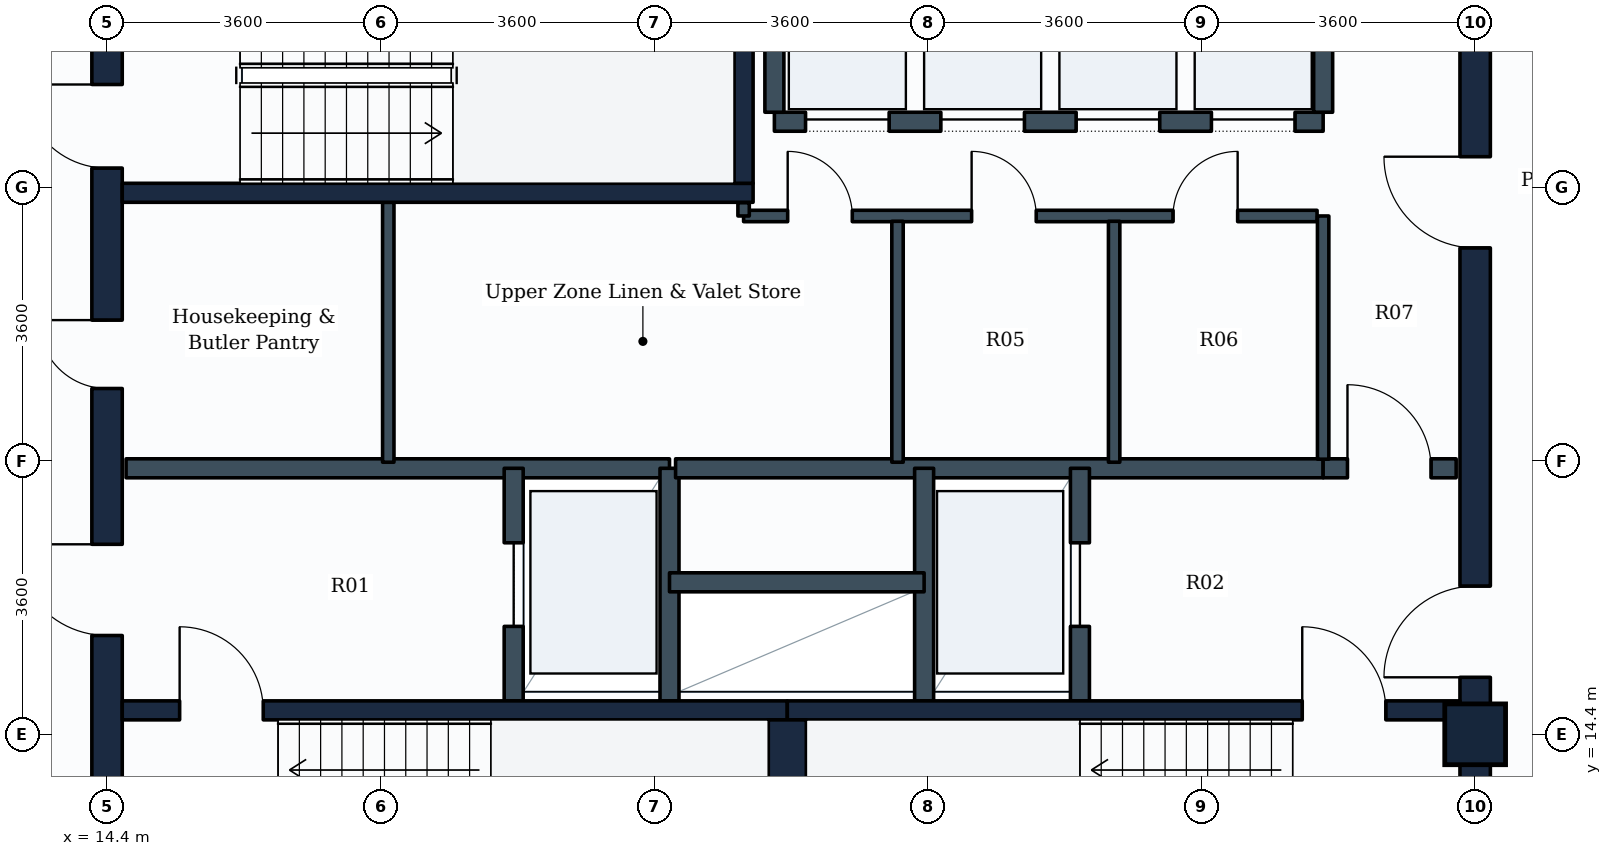
"""IFC4 building model, lengths in metres.
Left out: names, types, materials, properties, quantities, classifications, styles, units other than length and angle.
Written with IfcOpenShell. Run it as: python <this file> out.ifc"""

import sys

from ifc_helpers import new_model, si_unit, direction, frame, frame_2d, origin, origin_2d, place, context, subcontext, project, spatial, rectangle, extrude, element, fill, save


model = new_model("IFC4")
c1 = context("Model", 3, precision=1e-05, world=origin(), true_north=direction((0.0, 1.0)))
c2 = subcontext(c1, "Body", "Model", "MODEL_VIEW")
j1 = project(units=[si_unit("LENGTHUNIT", "METRE"), si_unit("PLANEANGLEUNIT", "RADIAN")], contexts=[c1])
p1 = place(None, origin())
s1 = spatial("IfcSite", under=j1, at=p1, CompositionType="ELEMENT")
p2 = place(p1, origin())
s2 = spatial("IfcBuilding", under=s1, at=p2, CompositionType="ELEMENT")
p3 = place(p2, frame((0.0, 0.0, 246.2)))
s3 = spatial("IfcBuildingStorey", under=s2, at=p3, CompositionType="ELEMENT", Elevation=246.2)
p4 = place(p3, frame((32.4, 14.4, 0.0), z_axis=(0.0, 0.0, 1.0), x_axis=(1.0, 0.0, 0.0)))
e1 = element("IfcColumn", 1, at=p4, inside=s3, PredefinedType="COLUMN", context=c2, shape_type="SweptSolid", body=[
    extrude(rectangle(XDim=0.8, YDim=0.8, at=origin_2d()), origin(), (0.0, 0.0, 1.0), 3.6),
])
p5 = place(p3, frame((14.4, 10.8, 0.0), z_axis=(0.0, 0.0, 1.0), x_axis=(0.0, 1.0, 0.0)))
e2 = element("IfcWall", 2, at=p5, inside=s3, PredefinedType="SHEAR", context=c2, shape_type="SweptSolid", body=[
    extrude(rectangle(XDim=14.4, YDim=0.4, at=frame_2d((7.2, 0.0))), origin(), (0.0, 0.0, 1.0), 3.28),
])
p6 = place(p5, frame((11.05, 0.0, 0.0)))
e3 = element("IfcOpeningElement", 3, at=p6, cuts=e2, PredefinedType="OPENING", context=c2, shape_type="SweptSolid", body=[
    extrude(rectangle(XDim=1.1, YDim=2.1, at=frame_2d((0.55, 1.05))), frame((0.0, 0.21, 0.0), z_axis=(0.0, -1.0, 0.0), x_axis=(1.0, 0.0, 0.0)), (0.0, 0.0, 1.0), 0.42),
])
p7 = place(p5, frame((4.9, 0.0, 0.0)))
e4 = element("IfcOpeningElement", 4, at=p7, cuts=e2, PredefinedType="OPENING", context=c2, shape_type="SweptSolid", body=[
    extrude(rectangle(XDim=1.2, YDim=2.1, at=frame_2d((0.6, 1.05))), frame((0.0, 0.21, 0.0), z_axis=(0.0, -1.0, 0.0), x_axis=(1.0, 0.0, 0.0)), (0.0, 0.0, 1.0), 0.42),
])
p8 = place(p5, frame((8.15, 0.0, 0.0)))
e5 = element("IfcOpeningElement", 5, at=p8, cuts=e2, PredefinedType="OPENING", context=c2, shape_type="SweptSolid", body=[
    extrude(rectangle(XDim=0.9, YDim=2.1, at=frame_2d((0.45, 1.05))), frame((0.0, 0.21, 0.0), z_axis=(0.0, -1.0, 0.0), x_axis=(1.0, 0.0, 0.0)), (0.0, 0.0, 1.0), 0.42),
])
p9 = place(p3, frame((32.4, 10.8, 0.0), z_axis=(0.0, 0.0, 1.0), x_axis=(0.0, 1.0, 0.0)))
e6 = element("IfcWall", 6, at=p9, inside=s3, PredefinedType="SHEAR", context=c2, shape_type="SweptSolid", body=[
    extrude(rectangle(XDim=14.4, YDim=0.4, at=frame_2d((7.2, 0.0))), origin(), (0.0, 0.0, 1.0), 3.28),
])
p10 = place(p9, frame((4.35, 0.0, 0.0)))
e7 = element("IfcOpeningElement", 7, at=p10, cuts=e6, PredefinedType="OPENING", context=c2, shape_type="SweptSolid", body=[
    extrude(rectangle(XDim=1.2, YDim=2.1, at=frame_2d((0.6, 1.05))), frame((0.0, 0.21, 0.0), z_axis=(0.0, -1.0, 0.0), x_axis=(1.0, 0.0, 0.0)), (0.0, 0.0, 1.0), 0.42),
])
p11 = place(p9, frame((10.0, 0.0, 0.0)))
e8 = element("IfcOpeningElement", 8, at=p11, cuts=e6, PredefinedType="OPENING", context=c2, shape_type="SweptSolid", body=[
    extrude(rectangle(XDim=1.2, YDim=2.1, at=frame_2d((0.6, 1.05))), frame((0.0, 0.21, 0.0), z_axis=(0.0, -1.0, 0.0), x_axis=(1.0, 0.0, 0.0)), (0.0, 0.0, 1.0), 0.42),
])
p12 = place(p3, frame((14.6, 14.715, 0.0), z_axis=(0.0, 0.0, 1.0), x_axis=(1.0, 0.0, 0.0)))
e9 = element("IfcWall", 9, at=p12, inside=s3, PredefinedType="SHEAR", context=c2, shape_type="SweptSolid", body=[
    extrude(rectangle(XDim=8.75, YDim=0.25, at=frame_2d((4.375, 0.0))), origin(), (0.0, 0.0, 1.0), 3.28),
])
p13 = place(p12, frame((0.755, 0.0, 0.0)))
e10 = element("IfcOpeningElement", 10, at=p13, cuts=e9, PredefinedType="OPENING", context=c2, shape_type="SweptSolid", body=[
    extrude(rectangle(XDim=1.1, YDim=2.1, at=frame_2d((0.55, 1.05))), frame((0.0, 0.135, 0.0), z_axis=(0.0, -1.0, 0.0), x_axis=(1.0, 0.0, 0.0)), (0.0, 0.0, 1.0), 0.27),
])
p14 = place(p3, frame((23.35, 14.715, 0.0), z_axis=(0.0, 0.0, 1.0), x_axis=(1.0, 0.0, 0.0)))
e11 = element("IfcWall", 11, at=p14, inside=s3, PredefinedType="SHEAR", context=c2, shape_type="SweptSolid", body=[
    extrude(rectangle(XDim=8.85, YDim=0.25, at=frame_2d((4.425, 0.0))), origin(), (0.0, 0.0, 1.0), 3.28),
])
p15 = place(p14, frame((6.775, 0.0, 0.0)))
e12 = element("IfcOpeningElement", 12, at=p15, cuts=e11, PredefinedType="OPENING", context=c2, shape_type="SweptSolid", body=[
    extrude(rectangle(XDim=1.1, YDim=2.1, at=frame_2d((0.55, 1.05))), frame((0.0, 0.135, 0.0), z_axis=(0.0, -1.0, 0.0), x_axis=(1.0, 0.0, 0.0)), (0.0, 0.0, 1.0), 0.27),
])
p16 = place(p3, frame((23.35, 11.75, 0.0), z_axis=(0.0, 0.0, 1.0), x_axis=(0.0, 1.0, 0.0)))
e13 = element("IfcWall", 13, at=p16, inside=s3, PredefinedType="SHEAR", context=c2, shape_type="SweptSolid", body=[
    extrude(rectangle(XDim=2.84, YDim=0.5, at=frame_2d((1.42, 0.0))), origin(), (0.0, 0.0, 1.0), 3.28),
])
p17 = place(p3, frame((14.6, 21.525, 0.0), z_axis=(0.0, 0.0, 1.0), x_axis=(1.0, 0.0, 0.0)))
e14 = element("IfcWall", 14, at=p17, inside=s3, PredefinedType="SHEAR", context=c2, shape_type="SweptSolid", body=[
    extrude(rectangle(XDim=8.3, YDim=0.25, at=frame_2d((4.15, 0.0))), origin(), (0.0, 0.0, 1.0), 3.28),
])
p18 = place(p3, frame((22.775, 21.65, 0.0), z_axis=(0.0, 0.0, 1.0), x_axis=(0.0, 1.0, 0.0)))
e15 = element("IfcWall", 15, at=p18, inside=s3, PredefinedType="SHEAR", context=c2, shape_type="SweptSolid", body=[
    extrude(rectangle(XDim=2.84, YDim=0.25, at=frame_2d((1.42, 0.0))), origin(), (0.0, 0.0, 1.0), 3.28),
])
p19 = place(p3, frame((14.65, 17.9, 0.0), z_axis=(0.0, 0.0, 1.0), x_axis=(1.0, 0.0, 0.0)))
e16 = element("IfcWall", 16, at=p19, inside=s3, PredefinedType="PARTITIONING", context=c2, shape_type="SweptSolid", body=[
    extrude(rectangle(XDim=7.15, YDim=0.25, at=frame_2d((3.575, 0.0))), origin(), (0.0, 0.0, 1.0), 3.265),
])
p20 = place(p3, frame((19.75, 14.84, 0.0), z_axis=(0.0, 0.0, 1.0), x_axis=(0.0, 1.0, 0.0)))
e17 = element("IfcWall", 17, at=p20, inside=s3, PredefinedType="PARTITIONING", context=c2, shape_type="SweptSolid", body=[
    extrude(rectangle(XDim=3.06, YDim=0.25, at=frame_2d((1.53, 0.0))), origin(), (0.0, 0.0, 1.0), 3.265),
])
p21 = place(p20, frame((0.98, 0.0, 0.0)))
e18 = element("IfcOpeningElement", 18, at=p21, cuts=e17, PredefinedType="OPENING", context=c2, shape_type="SweptSolid", body=[
    extrude(rectangle(XDim=1.1, YDim=2.1, at=frame_2d((0.55, 1.05))), frame((0.0, 0.135, 0.0), z_axis=(0.0, -1.0, 0.0), x_axis=(1.0, 0.0, 0.0)), (0.0, 0.0, 1.0), 0.27),
])
p22 = place(p3, frame((21.8, 14.84, 0.0), z_axis=(0.0, 0.0, 1.0), x_axis=(0.0, 1.0, 0.0)))
e19 = element("IfcWall", 19, at=p22, inside=s3, PredefinedType="PARTITIONING", context=c2, shape_type="SweptSolid", body=[
    extrude(rectangle(XDim=3.06, YDim=0.25, at=frame_2d((1.53, 0.0))), origin(), (0.0, 0.0, 1.0), 3.265),
])
p23 = place(p3, frame((21.88, 17.9, 0.0), z_axis=(0.0, 0.0, 1.0), x_axis=(1.0, 0.0, 0.0)))
e20 = element("IfcWall", 20, at=p23, inside=s3, PredefinedType="PARTITIONING", context=c2, shape_type="SweptSolid", body=[
    extrude(rectangle(XDim=8.52, YDim=0.25, at=frame_2d((4.26, 0.0))), origin(), (0.0, 0.0, 1.0), 3.265),
])
p24 = place(p3, frame((30.4, 17.9, 0.0), z_axis=(0.0, 0.0, 1.0), x_axis=(1.0, 0.0, 0.0)))
e21 = element("IfcWall", 21, at=p24, inside=s3, PredefinedType="PARTITIONING", context=c2, shape_type="SweptSolid", body=[
    extrude(rectangle(XDim=1.75, YDim=0.25, at=frame_2d((0.875, 0.0))), origin(), (0.0, 0.0, 1.0), 3.265),
])
p25 = place(p24, frame((0.32, 0.0, 0.0)))
e22 = element("IfcOpeningElement", 22, at=p25, cuts=e21, PredefinedType="OPENING", context=c2, shape_type="SweptSolid", body=[
    extrude(rectangle(XDim=1.1, YDim=2.1, at=frame_2d((0.55, 1.05))), frame((0.0, 0.135, 0.0), z_axis=(0.0, -1.0, 0.0), x_axis=(1.0, 0.0, 0.0)), (0.0, 0.0, 1.0), 0.27),
])
p26 = place(p3, frame((25.15, 14.84, 0.0), z_axis=(0.0, 0.0, 1.0), x_axis=(0.0, 1.0, 0.0)))
e23 = element("IfcWall", 23, at=p26, inside=s3, PredefinedType="PARTITIONING", context=c2, shape_type="SweptSolid", body=[
    extrude(rectangle(XDim=3.06, YDim=0.25, at=frame_2d((1.53, 0.0))), origin(), (0.0, 0.0, 1.0), 3.265),
])
p27 = place(p3, frame((27.2, 14.84, 0.0), z_axis=(0.0, 0.0, 1.0), x_axis=(0.0, 1.0, 0.0)))
e24 = element("IfcWall", 24, at=p27, inside=s3, PredefinedType="PARTITIONING", context=c2, shape_type="SweptSolid", body=[
    extrude(rectangle(XDim=3.06, YDim=0.25, at=frame_2d((1.53, 0.0))), origin(), (0.0, 0.0, 1.0), 3.265),
])
p28 = place(p27, frame((0.98, 0.0, 0.0)))
e25 = element("IfcOpeningElement", 25, at=p28, cuts=e24, PredefinedType="OPENING", context=c2, shape_type="SweptSolid", body=[
    extrude(rectangle(XDim=1.1, YDim=2.1, at=frame_2d((0.55, 1.05))), frame((0.0, 0.135, 0.0), z_axis=(0.0, -1.0, 0.0), x_axis=(1.0, 0.0, 0.0)), (0.0, 0.0, 1.0), 0.27),
])
p29 = place(p3, frame((21.8, 16.4, 0.0), z_axis=(0.0, 0.0, 1.0), x_axis=(1.0, 0.0, 0.0)))
e26 = element("IfcWall", 26, at=p29, inside=s3, PredefinedType="PARTITIONING", context=c2, shape_type="SweptSolid", body=[
    extrude(rectangle(XDim=3.35, YDim=0.25, at=frame_2d((1.675, 0.0))), origin(), (0.0, 0.0, 1.0), 3.265),
])
p30 = place(p3, frame((23.18, 22.46, 0.0), z_axis=(0.0, 0.0, 1.0), x_axis=(1.0, 0.0, 0.0)))
e27 = element("IfcWall", 27, at=p30, inside=s3, PredefinedType="PARTITIONING", context=c2, shape_type="SweptSolid", body=[
    extrude(rectangle(XDim=7.22, YDim=0.25, at=frame_2d((3.61, 0.0))), origin(), (0.0, 0.0, 1.0), 3.265),
])
p31 = place(p30, frame((0.41, 0.0, 0.0)))
e28 = element("IfcOpeningElement", 28, at=p31, cuts=e27, PredefinedType="OPENING", context=c2, shape_type="SweptSolid", body=[
    extrude(rectangle(XDim=1.1, YDim=2.1, at=frame_2d((0.55, 1.05))), frame((0.0, 0.135, 0.0), z_axis=(0.0, -1.0, 0.0), x_axis=(1.0, 0.0, 0.0)), (0.0, 0.0, 1.0), 0.27),
])
p32 = place(p30, frame((2.19, 0.0, 0.0)))
e29 = element("IfcOpeningElement", 29, at=p32, cuts=e27, PredefinedType="OPENING", context=c2, shape_type="SweptSolid", body=[
    extrude(rectangle(XDim=1.1, YDim=2.1, at=frame_2d((0.55, 1.05))), frame((0.0, 0.135, 0.0), z_axis=(0.0, -1.0, 0.0), x_axis=(1.0, 0.0, 0.0)), (0.0, 0.0, 1.0), 0.27),
])
p33 = place(p30, frame((3.97, 0.0, 0.0)))
e30 = element("IfcOpeningElement", 30, at=p33, cuts=e27, PredefinedType="OPENING", context=c2, shape_type="SweptSolid", body=[
    extrude(rectangle(XDim=1.1, YDim=2.1, at=frame_2d((0.55, 1.05))), frame((0.0, 0.135, 0.0), z_axis=(0.0, -1.0, 0.0), x_axis=(1.0, 0.0, 0.0)), (0.0, 0.0, 1.0), 0.27),
])
p34 = place(p30, frame((5.75, 0.0, 0.0)))
e31 = element("IfcOpeningElement", 31, at=p34, cuts=e27, PredefinedType="OPENING", context=c2, shape_type="SweptSolid", body=[
    extrude(rectangle(XDim=1.1, YDim=2.1, at=frame_2d((0.55, 1.05))), frame((0.0, 0.135, 0.0), z_axis=(0.0, -1.0, 0.0), x_axis=(1.0, 0.0, 0.0)), (0.0, 0.0, 1.0), 0.27),
])
for number, where, z_axis, x_axis in (
    (32, (23.18, 22.585, 0.0), (0.0, 0.0, 1.0), (0.0, 1.0, 0.0)),
    (33, (30.4, 22.585, 0.0), (0.0, 0.0, 1.0), (0.0, 1.0, 0.0)),
):
    element("IfcWall", number, at=place(p3, frame(where, z_axis=z_axis, x_axis=x_axis)), inside=s3, PredefinedType="PARTITIONING", context=c2, shape_type="SweptSolid", body=[
        extrude(rectangle(XDim=2.315, YDim=0.25, at=frame_2d((1.157, 0.0))), origin(), (0.0, 0.0, 1.0), 3.265),
    ])
p35 = place(p3, frame((22.775, 21.22, 0.0), z_axis=(0.0, 0.0, 1.0), x_axis=(1.0, 0.0, 0.0)))
e34 = element("IfcWall", 34, at=p35, inside=s3, PredefinedType="PARTITIONING", context=c2, shape_type="SweptSolid", body=[
    extrude(rectangle(XDim=7.545, YDim=0.15, at=frame_2d((3.772, 0.0))), origin(), (0.0, 0.0, 1.0), 3.265),
])
p36 = place(p35, frame((0.58, 0.0, 0.0)))
e35 = element("IfcOpeningElement", 35, at=p36, cuts=e34, PredefinedType="OPENING", context=c2, shape_type="SweptSolid", body=[
    extrude(rectangle(XDim=0.85, YDim=2.1, at=frame_2d((0.425, 1.05))), frame((0.0, 0.085, 0.0), z_axis=(0.0, -1.0, 0.0), x_axis=(1.0, 0.0, 0.0)), (0.0, 0.0, 1.0), 0.17),
])
p37 = place(p35, frame((3.0, 0.0, 0.0)))
e36 = element("IfcOpeningElement", 36, at=p37, cuts=e34, PredefinedType="OPENING", context=c2, shape_type="SweptSolid", body=[
    extrude(rectangle(XDim=0.85, YDim=2.1, at=frame_2d((0.425, 1.05))), frame((0.0, 0.085, 0.0), z_axis=(0.0, -1.0, 0.0), x_axis=(1.0, 0.0, 0.0)), (0.0, 0.0, 1.0), 0.17),
])
p38 = place(p35, frame((5.65, 0.0, 0.0)))
e37 = element("IfcOpeningElement", 37, at=p38, cuts=e34, PredefinedType="OPENING", context=c2, shape_type="SweptSolid", body=[
    extrude(rectangle(XDim=0.85, YDim=2.1, at=frame_2d((0.425, 1.05))), frame((0.0, 0.085, 0.0), z_axis=(0.0, -1.0, 0.0), x_axis=(1.0, 0.0, 0.0)), (0.0, 0.0, 1.0), 0.17),
])
p39 = place(p3, frame((22.775, 21.22, 0.0), z_axis=(0.0, 0.0, 1.0), x_axis=(0.0, 1.0, 0.0)))
e38 = element("IfcWall", 38, at=p39, inside=s3, PredefinedType="PARTITIONING", context=c2, shape_type="SweptSolid", body=[
    extrude(rectangle(XDim=0.175, YDim=0.15, at=frame_2d((0.087, 0.0))), origin(), (0.0, 0.0, 1.0), 3.265),
])
p40 = place(p3, frame((30.4, 18.02, 0.0), z_axis=(0.0, 0.0, 1.0), x_axis=(0.0, 1.0, 0.0)))
e39 = element("IfcWall", 39, at=p40, inside=s3, PredefinedType="PARTITIONING", context=c2, shape_type="SweptSolid", body=[
    extrude(rectangle(XDim=3.2, YDim=0.15, at=frame_2d((1.6, 0.0))), origin(), (0.0, 0.0, 1.0), 3.265),
])
p41 = place(p3, frame((18.1, 17.98, 0.0), z_axis=(0.0, 0.0, 1.0), x_axis=(0.0, 1.0, 0.0)))
e40 = element("IfcWall", 40, at=p41, inside=s3, PredefinedType="PARTITIONING", context=c2, shape_type="SweptSolid", body=[
    extrude(rectangle(XDim=3.42, YDim=0.15, at=frame_2d((1.71, 0.0))), origin(), (0.0, 0.0, 1.0), 3.265),
])
for number, where, z_axis, x_axis in (
    (41, (24.8, 17.98, 0.0), (0.0, 0.0, 1.0), (0.0, 1.0, 0.0)),
    (42, (27.65, 17.98, 0.0), (0.0, 0.0, 1.0), (0.0, 1.0, 0.0)),
):
    element("IfcWall", number, at=place(p3, frame(where, z_axis=z_axis, x_axis=x_axis)), inside=s3, PredefinedType="PARTITIONING", context=c2, shape_type="SweptSolid", body=[
        extrude(rectangle(XDim=3.17, YDim=0.15, at=frame_2d((1.585, 0.0))), origin(), (0.0, 0.0, 1.0), 3.265),
    ])
p42 = place(p13, origin())
e43 = element("IfcDoor", 43, at=p42, inside=s3, OperationType="SINGLE_SWING_LEFT", PredefinedType="DOOR", context=c2, shape_type="SweptSolid", body=[
    extrude(rectangle(XDim=1.1, YDim=2.1, at=frame_2d((0.55, 1.05))), frame((0.0, 0.025, 0.0), z_axis=(0.0, -1.0, 0.0), x_axis=(1.0, 0.0, 0.0)), (0.0, 0.0, 1.0), 0.05),
])
fill(e10, e43)
p43 = place(p15, origin())
e44 = element("IfcDoor", 44, at=p43, inside=s3, OperationType="SINGLE_SWING_LEFT", PredefinedType="DOOR", context=c2, shape_type="SweptSolid", body=[
    extrude(rectangle(XDim=1.1, YDim=2.1, at=frame_2d((0.55, 1.05))), frame((0.0, 0.025, 0.0), z_axis=(0.0, -1.0, 0.0), x_axis=(1.0, 0.0, 0.0)), (0.0, 0.0, 1.0), 0.05),
])
fill(e12, e44)
p44 = place(p6, origin())
e45 = element("IfcDoor", 45, at=p44, inside=s3, OperationType="SINGLE_SWING_RIGHT", PredefinedType="DOOR", context=c2, shape_type="SweptSolid", body=[
    extrude(rectangle(XDim=1.1, YDim=2.1, at=frame_2d((0.55, 1.05))), frame((0.0, 0.025, 0.0), z_axis=(0.0, -1.0, 0.0), x_axis=(1.0, 0.0, 0.0)), (0.0, 0.0, 1.0), 0.05),
])
fill(e3, e45)
p45 = place(p21, origin())
e46 = element("IfcDoor", 46, at=p45, inside=s3, OperationType="SLIDING_TO_LEFT", PredefinedType="DOOR", context=c2, shape_type="SweptSolid", body=[
    extrude(rectangle(XDim=1.1, YDim=2.1, at=frame_2d((0.55, 1.05))), frame((0.0, 0.025, 0.0), z_axis=(0.0, -1.0, 0.0), x_axis=(1.0, 0.0, 0.0)), (0.0, 0.0, 1.0), 0.05),
])
fill(e18, e46)
p46 = place(p28, origin())
e47 = element("IfcDoor", 47, at=p46, inside=s3, OperationType="SLIDING_TO_LEFT", PredefinedType="DOOR", context=c2, shape_type="SweptSolid", body=[
    extrude(rectangle(XDim=1.1, YDim=2.1, at=frame_2d((0.55, 1.05))), frame((0.0, 0.025, 0.0), z_axis=(0.0, -1.0, 0.0), x_axis=(1.0, 0.0, 0.0)), (0.0, 0.0, 1.0), 0.05),
])
fill(e25, e47)
p47 = place(p7, origin())
e48 = element("IfcDoor", 48, at=p47, inside=s3, OperationType="SINGLE_SWING_RIGHT", PredefinedType="DOOR", context=c2, shape_type="SweptSolid", body=[
    extrude(rectangle(XDim=1.2, YDim=2.1, at=frame_2d((0.6, 1.05))), frame((0.0, 0.025, 0.0), z_axis=(0.0, -1.0, 0.0), x_axis=(1.0, 0.0, 0.0)), (0.0, 0.0, 1.0), 0.05),
])
fill(e4, e48)
p48 = place(p10, origin())
e49 = element("IfcDoor", 49, at=p48, inside=s3, OperationType="SINGLE_SWING_LEFT", PredefinedType="DOOR", context=c2, shape_type="SweptSolid", body=[
    extrude(rectangle(XDim=1.2, YDim=2.1, at=frame_2d((0.6, 1.05))), frame((0.0, 0.025, 0.0), z_axis=(0.0, -1.0, 0.0), x_axis=(1.0, 0.0, 0.0)), (0.0, 0.0, 1.0), 0.05),
])
fill(e7, e49)
p49 = place(p25, origin())
e50 = element("IfcDoor", 50, at=p49, inside=s3, OperationType="SINGLE_SWING_LEFT", PredefinedType="DOOR", context=c2, shape_type="SweptSolid", body=[
    extrude(rectangle(XDim=1.1, YDim=2.1, at=frame_2d((0.55, 1.05))), frame((0.0, 0.025, 0.0), z_axis=(0.0, -1.0, 0.0), x_axis=(1.0, 0.0, 0.0)), (0.0, 0.0, 1.0), 0.05),
])
fill(e22, e50)
p50 = place(p31, origin())
e51 = element("IfcDoor", 51, at=p50, inside=s3, OperationType="SLIDING_TO_LEFT", PredefinedType="DOOR", context=c2, shape_type="SweptSolid", body=[
    extrude(rectangle(XDim=1.1, YDim=2.1, at=frame_2d((0.55, 1.05))), frame((0.0, 0.025, 0.0), z_axis=(0.0, -1.0, 0.0), x_axis=(1.0, 0.0, 0.0)), (0.0, 0.0, 1.0), 0.05),
])
fill(e28, e51)
p51 = place(p32, origin())
e52 = element("IfcDoor", 52, at=p51, inside=s3, OperationType="SLIDING_TO_LEFT", PredefinedType="DOOR", context=c2, shape_type="SweptSolid", body=[
    extrude(rectangle(XDim=1.1, YDim=2.1, at=frame_2d((0.55, 1.05))), frame((0.0, 0.025, 0.0), z_axis=(0.0, -1.0, 0.0), x_axis=(1.0, 0.0, 0.0)), (0.0, 0.0, 1.0), 0.05),
])
fill(e29, e52)
p52 = place(p33, origin())
e53 = element("IfcDoor", 53, at=p52, inside=s3, OperationType="SLIDING_TO_LEFT", PredefinedType="DOOR", context=c2, shape_type="SweptSolid", body=[
    extrude(rectangle(XDim=1.1, YDim=2.1, at=frame_2d((0.55, 1.05))), frame((0.0, 0.025, 0.0), z_axis=(0.0, -1.0, 0.0), x_axis=(1.0, 0.0, 0.0)), (0.0, 0.0, 1.0), 0.05),
])
fill(e30, e53)
p53 = place(p34, origin())
e54 = element("IfcDoor", 54, at=p53, inside=s3, OperationType="SLIDING_TO_LEFT", PredefinedType="DOOR", context=c2, shape_type="SweptSolid", body=[
    extrude(rectangle(XDim=1.1, YDim=2.1, at=frame_2d((0.55, 1.05))), frame((0.0, 0.025, 0.0), z_axis=(0.0, -1.0, 0.0), x_axis=(1.0, 0.0, 0.0)), (0.0, 0.0, 1.0), 0.05),
])
fill(e31, e54)
p54 = place(p11, origin())
e55 = element("IfcDoor", 55, at=p54, inside=s3, OperationType="SINGLE_SWING_RIGHT", PredefinedType="DOOR", context=c2, shape_type="SweptSolid", body=[
    extrude(rectangle(XDim=1.2, YDim=2.1, at=frame_2d((0.6, 1.05))), frame((0.0, 0.025, 0.0), z_axis=(0.0, -1.0, 0.0), x_axis=(1.0, 0.0, 0.0)), (0.0, 0.0, 1.0), 0.05),
])
fill(e8, e55)
p55 = place(p8, origin())
e56 = element("IfcDoor", 56, at=p55, inside=s3, OperationType="SINGLE_SWING_RIGHT", PredefinedType="DOOR", context=c2, shape_type="SweptSolid", body=[
    extrude(rectangle(XDim=0.9, YDim=2.1, at=frame_2d((0.45, 1.05))), frame((0.0, 0.025, 0.0), z_axis=(0.0, -1.0, 0.0), x_axis=(1.0, 0.0, 0.0)), (0.0, 0.0, 1.0), 0.05),
])
fill(e5, e56)
p56 = place(p36, origin())
e57 = element("IfcDoor", 57, at=p56, inside=s3, OperationType="SINGLE_SWING_LEFT", PredefinedType="DOOR", context=c2, shape_type="SweptSolid", body=[
    extrude(rectangle(XDim=0.85, YDim=2.1, at=frame_2d((0.425, 1.05))), frame((0.0, 0.025, 0.0), z_axis=(0.0, -1.0, 0.0), x_axis=(1.0, 0.0, 0.0)), (0.0, 0.0, 1.0), 0.05),
])
fill(e35, e57)
p57 = place(p37, origin())
e58 = element("IfcDoor", 58, at=p57, inside=s3, OperationType="SINGLE_SWING_LEFT", PredefinedType="DOOR", context=c2, shape_type="SweptSolid", body=[
    extrude(rectangle(XDim=0.85, YDim=2.1, at=frame_2d((0.425, 1.05))), frame((0.0, 0.025, 0.0), z_axis=(0.0, -1.0, 0.0), x_axis=(1.0, 0.0, 0.0)), (0.0, 0.0, 1.0), 0.05),
])
fill(e36, e58)
p58 = place(p38, origin())
e59 = element("IfcDoor", 59, at=p58, inside=s3, OperationType="SINGLE_SWING_RIGHT", PredefinedType="DOOR", context=c2, shape_type="SweptSolid", body=[
    extrude(rectangle(XDim=0.85, YDim=2.1, at=frame_2d((0.425, 1.05))), frame((0.0, 0.025, 0.0), z_axis=(0.0, -1.0, 0.0), x_axis=(1.0, 0.0, 0.0)), (0.0, 0.0, 1.0), 0.05),
])
fill(e37, e59)
save(model, sys.argv[1])
